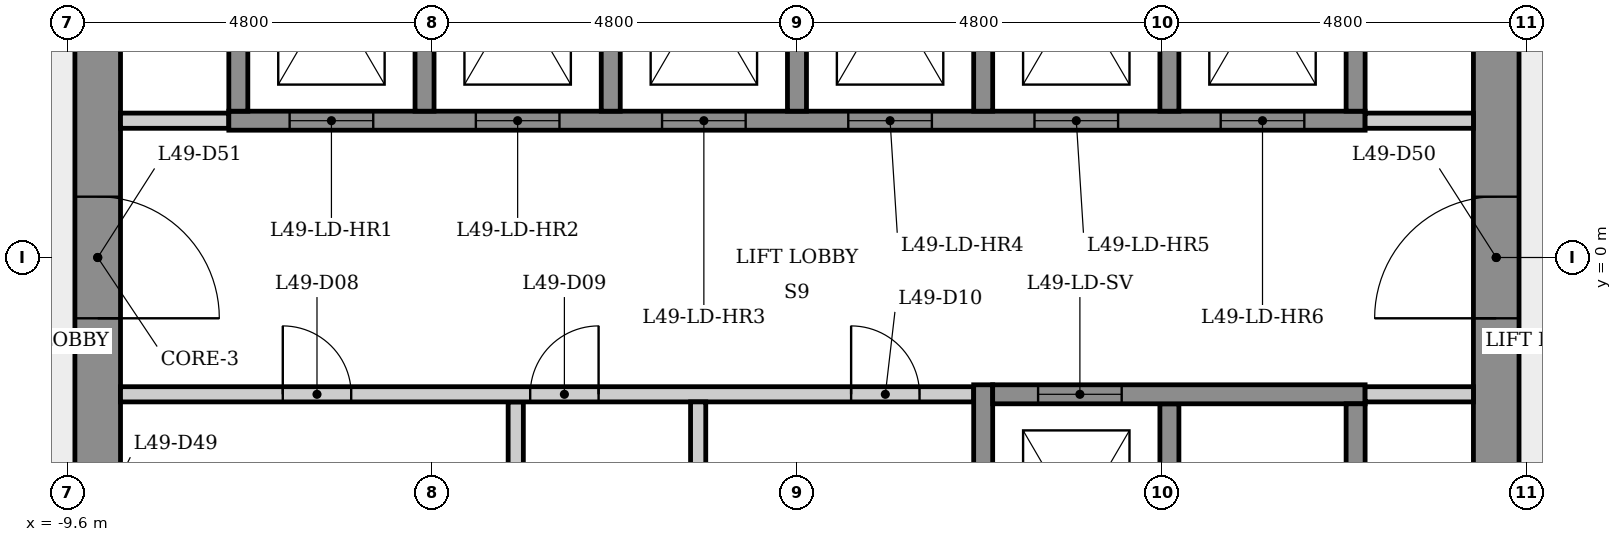
"""IFC4 building model, lengths in metres.
Left out: names, types, materials, properties, quantities, classifications, styles, units other than length and angle.
Written with IfcOpenShell. Run it as: python <this file> out.ifc"""

import sys

from ifc_helpers import new_model, si_unit, direction, frame, frame_2d, origin, place, context, subcontext, project, spatial, rectangle, extrude, element, fill, save


model = new_model("IFC4")
c1 = context("Model", 3, precision=1e-05, world=origin(), true_north=direction((0.0, 1.0)))
c2 = subcontext(c1, "Body", "Model", "MODEL_VIEW")
j1 = project(units=[si_unit("LENGTHUNIT", "METRE"), si_unit("PLANEANGLEUNIT", "RADIAN")], contexts=[c1])
p1 = place(None, origin())
s1 = spatial("IfcSite", under=j1, at=p1, CompositionType="ELEMENT")
p2 = place(p1, origin())
s2 = spatial("IfcBuilding", under=s1, at=p2, CompositionType="ELEMENT")
p3 = place(p2, frame((0.0, 0.0, 183.3)))
s3 = spatial("IfcBuildingStorey", under=s2, at=p3, CompositionType="ELEMENT", Elevation=183.3)
p4 = place(p3, frame((9.2, -5.485, 0.0), z_axis=(0.0, 0.0, 1.0), x_axis=(0.0, 1.0, 0.0)))
e1 = element("IfcWall", 1, at=p4, inside=s3, PredefinedType="SHEAR", context=c2, shape_type="SweptSolid", body=[
    extrude(rectangle(XDim=10.97, YDim=0.6, at=frame_2d((5.485, 0.0))), origin(), (0.0, 0.0, 1.0), 3.4),
])
p5 = place(p4, frame((4.685, 0.0, 0.0)))
e2 = element("IfcOpeningElement", 2, at=p5, cuts=e1, PredefinedType="OPENING", context=c2, shape_type="SweptSolid", body=[
    extrude(rectangle(XDim=1.6, YDim=2.1, at=frame_2d((0.8, 1.05))), frame((0.0, 0.31, 0.0), z_axis=(0.0, -1.0, 0.0), x_axis=(1.0, 0.0, 0.0)), (0.0, 0.0, 1.0), 0.62),
])
p6 = place(p3, frame((-9.2, 5.485, 0.0), z_axis=(0.0, 0.0, 1.0), x_axis=(0.0, -1.0, 0.0)))
e3 = element("IfcWall", 3, at=p6, inside=s3, PredefinedType="SHEAR", context=c2, shape_type="SweptSolid", body=[
    extrude(rectangle(XDim=10.97, YDim=0.6, at=frame_2d((5.485, 0.0))), origin(), (0.0, 0.0, 1.0), 3.4),
])
p7 = place(p6, frame((8.516, 0.0, 0.0)))
e4 = element("IfcOpeningElement", 4, at=p7, cuts=e3, PredefinedType="OPENING", context=c2, shape_type="SweptSolid", body=[
    extrude(rectangle(XDim=0.9, YDim=2.1, at=frame_2d((0.45, 1.05))), frame((0.0, 0.31, 0.0), z_axis=(0.0, -1.0, 0.0), x_axis=(1.0, 0.0, 0.0)), (0.0, 0.0, 1.0), 0.62),
])
p8 = place(p6, frame((4.685, 0.0, 0.0)))
e5 = element("IfcOpeningElement", 5, at=p8, cuts=e3, PredefinedType="OPENING", context=c2, shape_type="SweptSolid", body=[
    extrude(rectangle(XDim=1.6, YDim=2.1, at=frame_2d((0.8, 1.05))), frame((0.0, 0.31, 0.0), z_axis=(0.0, -1.0, 0.0), x_axis=(1.0, 0.0, 0.0)), (0.0, 0.0, 1.0), 0.62),
])
p9 = place(p3, frame((-8.9, 1.8, 0.0), z_axis=(0.0, 0.0, 1.0), x_axis=(1.0, 0.0, 0.0)))
e6 = element("IfcWall", 6, at=p9, inside=s3, PredefinedType="PARTITIONING", context=c2, shape_type="SweptSolid", body=[
    extrude(rectangle(XDim=1.425, YDim=0.2, at=frame_2d((0.712, 0.0))), origin(), (0.0, 0.0, 1.0), 3.0),
])
p10 = place(p3, frame((-7.475, 1.8, 0.0), z_axis=(0.0, 0.0, 1.0), x_axis=(1.0, 0.0, 0.0)))
e7 = element("IfcWall", 7, at=p10, inside=s3, PredefinedType="SHEAR", context=c2, shape_type="SweptSolid", body=[
    extrude(rectangle(XDim=14.95, YDim=0.25, at=frame_2d((7.475, 0.0))), origin(), (0.0, 0.0, 1.0), 3.0),
])
p11 = place(p10, frame((0.8, 0.0, 0.0)))
e8 = element("IfcOpeningElement", 8, at=p11, cuts=e7, PredefinedType="OPENING", context=c2, shape_type="SweptSolid", body=[
    extrude(rectangle(XDim=1.1, YDim=2.1, at=frame_2d((0.55, 1.05))), frame((0.0, 0.135, 0.0), z_axis=(0.0, -1.0, 0.0), x_axis=(1.0, 0.0, 0.0)), (0.0, 0.0, 1.0), 0.27),
])
p12 = place(p10, frame((3.25, 0.0, 0.0)))
e9 = element("IfcOpeningElement", 9, at=p12, cuts=e7, PredefinedType="OPENING", context=c2, shape_type="SweptSolid", body=[
    extrude(rectangle(XDim=1.1, YDim=2.1, at=frame_2d((0.55, 1.05))), frame((0.0, 0.135, 0.0), z_axis=(0.0, -1.0, 0.0), x_axis=(1.0, 0.0, 0.0)), (0.0, 0.0, 1.0), 0.27),
])
p13 = place(p10, frame((5.7, 0.0, 0.0)))
e10 = element("IfcOpeningElement", 10, at=p13, cuts=e7, PredefinedType="OPENING", context=c2, shape_type="SweptSolid", body=[
    extrude(rectangle(XDim=1.1, YDim=2.1, at=frame_2d((0.55, 1.05))), frame((0.0, 0.135, 0.0), z_axis=(0.0, -1.0, 0.0), x_axis=(1.0, 0.0, 0.0)), (0.0, 0.0, 1.0), 0.27),
])
p14 = place(p10, frame((8.15, 0.0, 0.0)))
e11 = element("IfcOpeningElement", 11, at=p14, cuts=e7, PredefinedType="OPENING", context=c2, shape_type="SweptSolid", body=[
    extrude(rectangle(XDim=1.1, YDim=2.1, at=frame_2d((0.55, 1.05))), frame((0.0, 0.135, 0.0), z_axis=(0.0, -1.0, 0.0), x_axis=(1.0, 0.0, 0.0)), (0.0, 0.0, 1.0), 0.27),
])
p15 = place(p10, frame((10.6, 0.0, 0.0)))
e12 = element("IfcOpeningElement", 12, at=p15, cuts=e7, PredefinedType="OPENING", context=c2, shape_type="SweptSolid", body=[
    extrude(rectangle(XDim=1.1, YDim=2.1, at=frame_2d((0.55, 1.05))), frame((0.0, 0.135, 0.0), z_axis=(0.0, -1.0, 0.0), x_axis=(1.0, 0.0, 0.0)), (0.0, 0.0, 1.0), 0.27),
])
p16 = place(p10, frame((13.05, 0.0, 0.0)))
e13 = element("IfcOpeningElement", 13, at=p16, cuts=e7, PredefinedType="OPENING", context=c2, shape_type="SweptSolid", body=[
    extrude(rectangle(XDim=1.1, YDim=2.1, at=frame_2d((0.55, 1.05))), frame((0.0, 0.135, 0.0), z_axis=(0.0, -1.0, 0.0), x_axis=(1.0, 0.0, 0.0)), (0.0, 0.0, 1.0), 0.27),
])
p17 = place(p3, frame((-7.35, 1.925, 0.0), z_axis=(0.0, 0.0, 1.0), x_axis=(0.0, 1.0, 0.0)))
e14 = element("IfcWall", 14, at=p17, inside=s3, PredefinedType="SHEAR", context=c2, shape_type="SweptSolid", body=[
    extrude(rectangle(XDim=4.036, YDim=0.25, at=frame_2d((2.018, 0.0))), origin(), (0.0, 0.0, 1.0), 3.0),
])
p18 = place(p3, frame((-4.9, 5.025, 0.0), z_axis=(0.0, 0.0, 1.0), x_axis=(0.0, -1.0, 0.0)))
e15 = element("IfcWall", 15, at=p18, inside=s3, PredefinedType="SHEAR", context=c2, shape_type="SweptSolid", body=[
    extrude(rectangle(XDim=3.1, YDim=0.25, at=frame_2d((1.55, 0.0))), origin(), (0.0, 0.0, 1.0), 3.4),
])
p19 = place(p3, frame((-3.7, -1.9, 0.0), z_axis=(0.0, 0.0, 1.0), x_axis=(0.0, -1.0, 0.0)))
e16 = element("IfcWall", 16, at=p19, inside=s3, PredefinedType="PARTITIONING", context=c2, shape_type="SweptSolid", body=[
    extrude(rectangle(XDim=3.15, YDim=0.2, at=frame_2d((1.575, 0.0))), origin(), (0.0, 0.0, 1.0), 3.0),
])
p20 = place(p3, frame((-8.9, -1.8, 0.0), z_axis=(0.0, 0.0, 1.0), x_axis=(1.0, 0.0, 0.0)))
e17 = element("IfcWall", 17, at=p20, inside=s3, PredefinedType="PARTITIONING", context=c2, shape_type="SweptSolid", body=[
    extrude(rectangle(XDim=11.225, YDim=0.2, at=frame_2d((5.613, 0.0))), origin(), (0.0, 0.0, 1.0), 3.0),
])
p21 = place(p20, frame((2.135, 0.0, 0.0)))
e18 = element("IfcOpeningElement", 18, at=p21, cuts=e17, PredefinedType="OPENING", context=c2, shape_type="SweptSolid", body=[
    extrude(rectangle(XDim=0.9, YDim=2.1, at=frame_2d((0.45, 1.05))), frame((0.0, 0.11, 0.0), z_axis=(0.0, -1.0, 0.0), x_axis=(1.0, 0.0, 0.0)), (0.0, 0.0, 1.0), 0.22),
])
p22 = place(p20, frame((5.39, 0.0, 0.0)))
e19 = element("IfcOpeningElement", 19, at=p22, cuts=e17, PredefinedType="OPENING", context=c2, shape_type="SweptSolid", body=[
    extrude(rectangle(XDim=0.9, YDim=2.1, at=frame_2d((0.45, 1.05))), frame((0.0, 0.11, 0.0), z_axis=(0.0, -1.0, 0.0), x_axis=(1.0, 0.0, 0.0)), (0.0, 0.0, 1.0), 0.22),
])
p23 = place(p20, frame((9.613, 0.0, 0.0)))
e20 = element("IfcOpeningElement", 20, at=p23, cuts=e17, PredefinedType="OPENING", context=c2, shape_type="SweptSolid", body=[
    extrude(rectangle(XDim=0.9, YDim=2.1, at=frame_2d((0.45, 1.05))), frame((0.0, 0.11, 0.0), z_axis=(0.0, -1.0, 0.0), x_axis=(1.0, 0.0, 0.0)), (0.0, 0.0, 1.0), 0.22),
])
p24 = place(p3, frame((-2.45, 5.025, 0.0), z_axis=(0.0, 0.0, 1.0), x_axis=(0.0, -1.0, 0.0)))
e21 = element("IfcWall", 21, at=p24, inside=s3, PredefinedType="SHEAR", context=c2, shape_type="SweptSolid", body=[
    extrude(rectangle(XDim=3.1, YDim=0.25, at=frame_2d((1.55, 0.0))), origin(), (0.0, 0.0, 1.0), 3.4),
])
p25 = place(p3, frame((-1.3, -1.9, 0.0), z_axis=(0.0, 0.0, 1.0), x_axis=(0.0, -1.0, 0.0)))
e22 = element("IfcWall", 22, at=p25, inside=s3, PredefinedType="PARTITIONING", context=c2, shape_type="SweptSolid", body=[
    extrude(rectangle(XDim=3.15, YDim=0.2, at=frame_2d((1.575, 0.0))), origin(), (0.0, 0.0, 1.0), 3.0),
])
p26 = place(p3, frame((0.0, 5.025, 0.0), z_axis=(0.0, 0.0, 1.0), x_axis=(0.0, -1.0, 0.0)))
e23 = element("IfcWall", 23, at=p26, inside=s3, PredefinedType="SHEAR", context=c2, shape_type="SweptSolid", body=[
    extrude(rectangle(XDim=3.1, YDim=0.25, at=frame_2d((1.55, 0.0))), origin(), (0.0, 0.0, 1.0), 3.4),
])
p27 = place(p3, frame((2.45, -5.275, 0.0), z_axis=(0.0, 0.0, 1.0), x_axis=(0.0, 1.0, 0.0)))
e24 = element("IfcWall", 24, at=p27, inside=s3, PredefinedType="SHEAR", context=c2, shape_type="SweptSolid", body=[
    extrude(rectangle(XDim=3.6, YDim=0.25, at=frame_2d((1.8, 0.0))), origin(), (0.0, 0.0, 1.0), 3.0),
])
for number, where, z_axis, x_axis in (
    (25, (2.45, 5.025, 0.0), (0.0, 0.0, 1.0), (0.0, -1.0, 0.0)),
    (26, (4.9, -1.925, 0.0), (0.0, 0.0, 1.0), (0.0, -1.0, 0.0)),
    (27, (4.9, 5.025, 0.0), (0.0, 0.0, 1.0), (0.0, -1.0, 0.0)),
):
    element("IfcWall", number, at=place(p3, frame(where, z_axis=z_axis, x_axis=x_axis)), inside=s3, PredefinedType="SHEAR", context=c2, shape_type="SweptSolid", body=[
        extrude(rectangle(XDim=3.1, YDim=0.25, at=frame_2d((1.55, 0.0))), origin(), (0.0, 0.0, 1.0), 3.4),
    ])
p28 = place(p3, frame((2.575, -1.8, 0.0), z_axis=(0.0, 0.0, 1.0), x_axis=(1.0, 0.0, 0.0)))
e28 = element("IfcWall", 28, at=p28, inside=s3, PredefinedType="SHEAR", context=c2, shape_type="SweptSolid", body=[
    extrude(rectangle(XDim=4.9, YDim=0.25, at=frame_2d((2.45, 0.0))), origin(), (0.0, 0.0, 1.0), 3.0),
])
p29 = place(p28, frame((0.597, 0.0, 0.0)))
e29 = element("IfcOpeningElement", 29, at=p29, cuts=e28, PredefinedType="OPENING", context=c2, shape_type="SweptSolid", body=[
    extrude(rectangle(XDim=1.1, YDim=2.1, at=frame_2d((0.55, 1.05))), frame((0.0, 0.135, 0.0), z_axis=(0.0, -1.0, 0.0), x_axis=(1.0, 0.0, 0.0)), (0.0, 0.0, 1.0), 0.27),
])
p30 = place(p3, frame((7.475, 1.8, 0.0), z_axis=(0.0, 0.0, 1.0), x_axis=(1.0, 0.0, 0.0)))
e30 = element("IfcWall", 30, at=p30, inside=s3, PredefinedType="PARTITIONING", context=c2, shape_type="SweptSolid", body=[
    extrude(rectangle(XDim=1.425, YDim=0.2, at=frame_2d((0.712, 0.0))), origin(), (0.0, 0.0, 1.0), 3.0),
])
for number, where, z_axis, x_axis in (
    (31, (7.35, -1.925, 0.0), (0.0, 0.0, 1.0), (0.0, -1.0, 0.0)),
    (32, (7.35, 5.025, 0.0), (0.0, 0.0, 1.0), (0.0, -1.0, 0.0)),
):
    element("IfcWall", number, at=place(p3, frame(where, z_axis=z_axis, x_axis=x_axis)), inside=s3, PredefinedType="SHEAR", context=c2, shape_type="SweptSolid", body=[
        extrude(rectangle(XDim=3.1, YDim=0.25, at=frame_2d((1.55, 0.0))), origin(), (0.0, 0.0, 1.0), 3.4),
    ])
p31 = place(p3, frame((8.9, -1.8, 0.0), z_axis=(0.0, 0.0, 1.0), x_axis=(-1.0, 0.0, 0.0)))
e33 = element("IfcWall", 33, at=p31, inside=s3, PredefinedType="PARTITIONING", context=c2, shape_type="SweptSolid", body=[
    extrude(rectangle(XDim=1.425, YDim=0.2, at=frame_2d((0.712, 0.0))), origin(), (0.0, 0.0, 1.0), 3.0),
])
p32 = place(p11, origin())
e34 = element("IfcDoor", 34, at=p32, inside=s3, OperationType="SLIDING_TO_LEFT", PredefinedType="DOOR", context=c2, shape_type="SweptSolid", body=[
    extrude(rectangle(XDim=1.1, YDim=2.1, at=frame_2d((0.55, 1.05))), frame((0.0, 0.025, 0.0), z_axis=(0.0, -1.0, 0.0), x_axis=(1.0, 0.0, 0.0)), (0.0, 0.0, 1.0), 0.05),
])
fill(e8, e34)
p33 = place(p12, origin())
e35 = element("IfcDoor", 35, at=p33, inside=s3, OperationType="SLIDING_TO_LEFT", PredefinedType="DOOR", context=c2, shape_type="SweptSolid", body=[
    extrude(rectangle(XDim=1.1, YDim=2.1, at=frame_2d((0.55, 1.05))), frame((0.0, 0.025, 0.0), z_axis=(0.0, -1.0, 0.0), x_axis=(1.0, 0.0, 0.0)), (0.0, 0.0, 1.0), 0.05),
])
fill(e9, e35)
p34 = place(p13, origin())
e36 = element("IfcDoor", 36, at=p34, inside=s3, OperationType="SLIDING_TO_LEFT", PredefinedType="DOOR", context=c2, shape_type="SweptSolid", body=[
    extrude(rectangle(XDim=1.1, YDim=2.1, at=frame_2d((0.55, 1.05))), frame((0.0, 0.025, 0.0), z_axis=(0.0, -1.0, 0.0), x_axis=(1.0, 0.0, 0.0)), (0.0, 0.0, 1.0), 0.05),
])
fill(e10, e36)
p35 = place(p14, origin())
e37 = element("IfcDoor", 37, at=p35, inside=s3, OperationType="SLIDING_TO_LEFT", PredefinedType="DOOR", context=c2, shape_type="SweptSolid", body=[
    extrude(rectangle(XDim=1.1, YDim=2.1, at=frame_2d((0.55, 1.05))), frame((0.0, 0.025, 0.0), z_axis=(0.0, -1.0, 0.0), x_axis=(1.0, 0.0, 0.0)), (0.0, 0.0, 1.0), 0.05),
])
fill(e11, e37)
p36 = place(p15, origin())
e38 = element("IfcDoor", 38, at=p36, inside=s3, OperationType="SLIDING_TO_LEFT", PredefinedType="DOOR", context=c2, shape_type="SweptSolid", body=[
    extrude(rectangle(XDim=1.1, YDim=2.1, at=frame_2d((0.55, 1.05))), frame((0.0, 0.025, 0.0), z_axis=(0.0, -1.0, 0.0), x_axis=(1.0, 0.0, 0.0)), (0.0, 0.0, 1.0), 0.05),
])
fill(e12, e38)
p37 = place(p16, origin())
e39 = element("IfcDoor", 39, at=p37, inside=s3, OperationType="SLIDING_TO_LEFT", PredefinedType="DOOR", context=c2, shape_type="SweptSolid", body=[
    extrude(rectangle(XDim=1.1, YDim=2.1, at=frame_2d((0.55, 1.05))), frame((0.0, 0.025, 0.0), z_axis=(0.0, -1.0, 0.0), x_axis=(1.0, 0.0, 0.0)), (0.0, 0.0, 1.0), 0.05),
])
fill(e13, e39)
p38 = place(p29, origin())
e40 = element("IfcDoor", 40, at=p38, inside=s3, OperationType="SLIDING_TO_LEFT", PredefinedType="DOOR", context=c2, shape_type="SweptSolid", body=[
    extrude(rectangle(XDim=1.1, YDim=2.1, at=frame_2d((0.55, 1.05))), frame((0.0, 0.025, 0.0), z_axis=(0.0, -1.0, 0.0), x_axis=(1.0, 0.0, 0.0)), (0.0, 0.0, 1.0), 0.05),
])
fill(e29, e40)
p39 = place(p21, origin())
e41 = element("IfcDoor", 41, at=p39, inside=s3, OperationType="SINGLE_SWING_LEFT", PredefinedType="DOOR", context=c2, shape_type="SweptSolid", body=[
    extrude(rectangle(XDim=0.9, YDim=2.1, at=frame_2d((0.45, 1.05))), frame((0.0, 0.025, 0.0), z_axis=(0.0, -1.0, 0.0), x_axis=(1.0, 0.0, 0.0)), (0.0, 0.0, 1.0), 0.05),
])
fill(e18, e41)
p40 = place(p22, origin())
e42 = element("IfcDoor", 42, at=p40, inside=s3, OperationType="SINGLE_SWING_RIGHT", PredefinedType="DOOR", context=c2, shape_type="SweptSolid", body=[
    extrude(rectangle(XDim=0.9, YDim=2.1, at=frame_2d((0.45, 1.05))), frame((0.0, 0.025, 0.0), z_axis=(0.0, -1.0, 0.0), x_axis=(1.0, 0.0, 0.0)), (0.0, 0.0, 1.0), 0.05),
])
fill(e19, e42)
p41 = place(p23, origin())
e43 = element("IfcDoor", 43, at=p41, inside=s3, OperationType="SINGLE_SWING_LEFT", PredefinedType="DOOR", context=c2, shape_type="SweptSolid", body=[
    extrude(rectangle(XDim=0.9, YDim=2.1, at=frame_2d((0.45, 1.05))), frame((0.0, 0.025, 0.0), z_axis=(0.0, -1.0, 0.0), x_axis=(1.0, 0.0, 0.0)), (0.0, 0.0, 1.0), 0.05),
])
fill(e20, e43)
p42 = place(p5, origin())
e44 = element("IfcDoor", 44, at=p42, inside=s3, OperationType="SINGLE_SWING_LEFT", PredefinedType="DOOR", context=c2, shape_type="SweptSolid", body=[
    extrude(rectangle(XDim=1.6, YDim=2.1, at=frame_2d((0.8, 1.05))), frame((0.0, 0.025, 0.0), z_axis=(0.0, -1.0, 0.0), x_axis=(1.0, 0.0, 0.0)), (0.0, 0.0, 1.0), 0.05),
])
fill(e2, e44)
p43 = place(p8, origin())
e45 = element("IfcDoor", 45, at=p43, inside=s3, OperationType="SINGLE_SWING_RIGHT", PredefinedType="DOOR", context=c2, shape_type="SweptSolid", body=[
    extrude(rectangle(XDim=1.6, YDim=2.1, at=frame_2d((0.8, 1.05))), frame((0.0, 0.025, 0.0), z_axis=(0.0, -1.0, 0.0), x_axis=(1.0, 0.0, 0.0)), (0.0, 0.0, 1.0), 0.05),
])
fill(e5, e45)
save(model, sys.argv[1])
